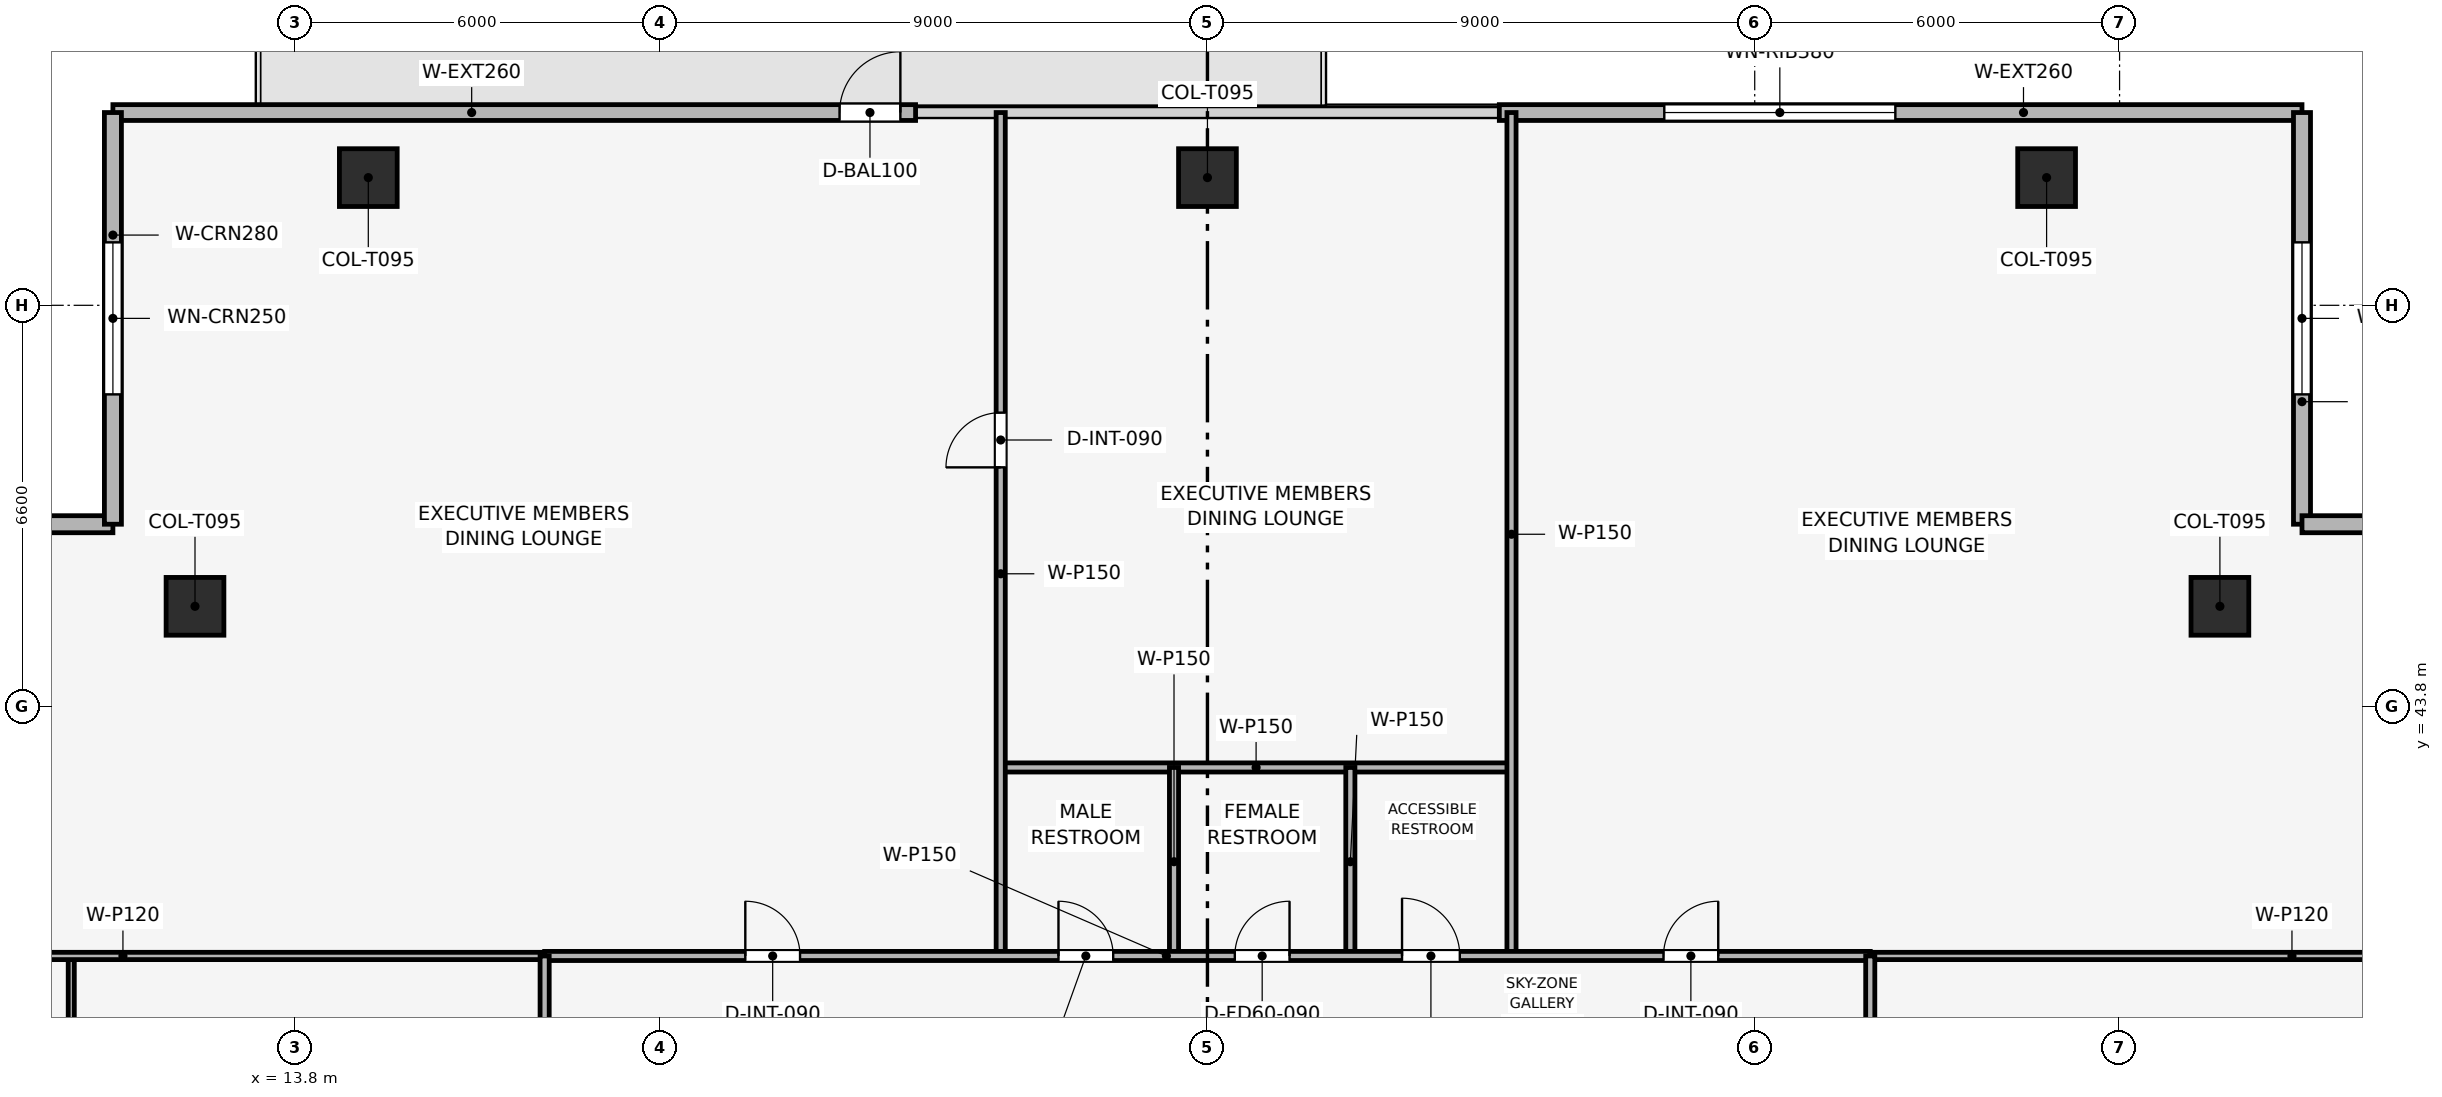
"""IFC4 building model, lengths in metres.
Left out: names, types, materials, properties, quantities, classifications, styles, units other than length and angle.
Written with IfcOpenShell. Run it as: python <this file> out.ifc"""

import sys

from ifc_helpers import new_model, si_unit, direction, frame, frame_2d, origin, origin_2d, place, context, subcontext, project, spatial, rectangle, extrude, element, fill, save


model = new_model("IFC4")
c1 = context("Model", 3, precision=1e-05, world=origin(), true_north=direction((0.0, 1.0)))
c2 = subcontext(c1, "Body", "Model", "MODEL_VIEW")
j1 = project(units=[si_unit("LENGTHUNIT", "METRE"), si_unit("PLANEANGLEUNIT", "RADIAN")], contexts=[c1])
p1 = place(None, origin())
s1 = spatial("IfcSite", under=j1, at=p1, CompositionType="ELEMENT")
p2 = place(p1, origin())
s2 = spatial("IfcBuilding", under=s1, at=p2, CompositionType="ELEMENT")
p3 = place(p2, frame((0.0, 0.0, 257.85)))
s3 = spatial("IfcBuildingStorey", under=s2, at=p3, CompositionType="ELEMENT", Elevation=257.85)
for number, where, z_axis, x_axis in (
    (1, (42.6, 52.5, 0.003), (0.0, 0.0, 1.0), (1.0, 0.0, 0.0)),
    (2, (28.8, 52.5, 0.003), (0.0, 0.0, 1.0), (1.0, 0.0, 0.0)),
    (3, (15.0, 52.5, 0.003), (0.0, 0.0, 1.0), (1.0, 0.0, 0.0)),
    (4, (45.45, 45.45, 0.003), (0.0, 0.0, 1.0), (1.0, 0.0, 0.0)),
    (5, (12.15, 45.45, 0.003), (0.0, 0.0, 1.0), (1.0, 0.0, 0.0)),
):
    element("IfcColumn", number, at=place(p3, frame(where, z_axis=z_axis, x_axis=x_axis)), inside=s3, PredefinedType="COLUMN", context=c2, shape_type="SweptSolid", body=[
        extrude(rectangle(XDim=0.95, YDim=0.95, at=origin_2d()), origin(), (0.0, 0.0, 1.0), 3.494),
    ])
p4 = place(p3, frame((10.8, 53.57, 0.0), z_axis=(0.0, 0.0, 1.0), x_axis=(1.0, 0.0, 0.0)))
e6 = element("IfcWall", 6, at=p4, inside=s3, PredefinedType="SOLIDWALL", context=c2, shape_type="SweptSolid", body=[
    extrude(rectangle(XDim=13.2, YDim=0.26, at=frame_2d((6.6, 0.0))), origin(), (0.0, 0.0, 1.0), 3.5),
])
p5 = place(p4, frame((11.95, 0.0, 0.0)))
e7 = element("IfcOpeningElement", 7, at=p5, cuts=e6, PredefinedType="OPENING", context=c2, shape_type="SweptSolid", body=[
    extrude(rectangle(XDim=1.0, YDim=2.2, at=frame_2d((0.5, 1.1))), frame((0.0, 0.14, 0.0), z_axis=(0.0, -1.0, 0.0), x_axis=(1.0, 0.0, 0.0)), (0.0, 0.0, 1.0), 0.28),
])
p6 = place(p3, frame((33.6, 53.57, 0.0), z_axis=(0.0, 0.0, 1.0), x_axis=(1.0, 0.0, 0.0)))
e8 = element("IfcWall", 8, at=p6, inside=s3, PredefinedType="SOLIDWALL", context=c2, shape_type="SweptSolid", body=[
    extrude(rectangle(XDim=13.2, YDim=0.26, at=frame_2d((6.6, 0.0))), origin(), (0.0, 0.0, 1.0), 3.5),
])
p7 = place(p6, frame((2.713, 0.0, 0.9)))
e9 = element("IfcOpeningElement", 9, at=p7, cuts=e8, PredefinedType="OPENING", context=c2, shape_type="SweptSolid", body=[
    extrude(rectangle(XDim=3.8, YDim=1.9, at=frame_2d((1.9, 0.95))), frame((0.0, 0.14, 0.0), z_axis=(0.0, -1.0, 0.0), x_axis=(1.0, 0.0, 0.0)), (0.0, 0.0, 1.0), 0.28),
])
p8 = place(p3, frame((4.03, 46.8, 0.0), z_axis=(0.0, 0.0, 1.0), x_axis=(1.0, 0.0, 0.0)))
e10 = element("IfcWall", 10, at=p8, inside=s3, PredefinedType="SOLIDWALL", context=c2, shape_type="SweptSolid", body=[
    extrude(rectangle(XDim=6.77, YDim=0.28, at=frame_2d((3.385, 0.0))), origin(), (0.0, 0.0, 1.0), 3.5),
])
p9 = place(p8, frame((2.135, 0.0, 0.9)))
e11 = element("IfcOpeningElement", 11, at=p9, cuts=e10, PredefinedType="OPENING", context=c2, shape_type="SweptSolid", body=[
    extrude(rectangle(XDim=2.5, YDim=1.9, at=frame_2d((1.25, 0.95))), frame((0.0, 0.15, 0.0), z_axis=(0.0, -1.0, 0.0), x_axis=(1.0, 0.0, 0.0)), (0.0, 0.0, 1.0), 0.3),
])
p10 = place(p3, frame((10.8, 46.8, 0.0), z_axis=(0.0, 0.0, 1.0), x_axis=(0.0, 1.0, 0.0)))
e12 = element("IfcWall", 12, at=p10, inside=s3, PredefinedType="SOLIDWALL", context=c2, shape_type="SweptSolid", body=[
    extrude(rectangle(XDim=6.77, YDim=0.28, at=frame_2d((3.385, 0.0))), origin(), (0.0, 0.0, 1.0), 3.5),
])
p11 = place(p10, frame((2.135, 0.0, 0.9)))
e13 = element("IfcOpeningElement", 13, at=p11, cuts=e12, PredefinedType="OPENING", context=c2, shape_type="SweptSolid", body=[
    extrude(rectangle(XDim=2.5, YDim=1.9, at=frame_2d((1.25, 0.95))), frame((0.0, 0.15, 0.0), z_axis=(0.0, -1.0, 0.0), x_axis=(1.0, 0.0, 0.0)), (0.0, 0.0, 1.0), 0.3),
])
p12 = place(p3, frame((46.8, 53.57, 0.0), z_axis=(0.0, 0.0, 1.0), x_axis=(0.0, -1.0, 0.0)))
e14 = element("IfcWall", 14, at=p12, inside=s3, PredefinedType="SOLIDWALL", context=c2, shape_type="SweptSolid", body=[
    extrude(rectangle(XDim=6.77, YDim=0.28, at=frame_2d((3.385, 0.0))), origin(), (0.0, 0.0, 1.0), 3.5),
])
p13 = place(p12, frame((2.135, 0.0, 0.9)))
e15 = element("IfcOpeningElement", 15, at=p13, cuts=e14, PredefinedType="OPENING", context=c2, shape_type="SweptSolid", body=[
    extrude(rectangle(XDim=2.5, YDim=1.9, at=frame_2d((1.25, 0.95))), frame((0.0, 0.15, 0.0), z_axis=(0.0, -1.0, 0.0), x_axis=(1.0, 0.0, 0.0)), (0.0, 0.0, 1.0), 0.3),
])
p14 = place(p3, frame((46.8, 46.8, 0.0), z_axis=(0.0, 0.0, 1.0), x_axis=(1.0, 0.0, 0.0)))
e16 = element("IfcWall", 16, at=p14, inside=s3, PredefinedType="SOLIDWALL", context=c2, shape_type="SweptSolid", body=[
    extrude(rectangle(XDim=6.77, YDim=0.28, at=frame_2d((3.385, 0.0))), origin(), (0.0, 0.0, 1.0), 3.5),
])
p15 = place(p14, frame((2.135, 0.0, 0.9)))
e17 = element("IfcOpeningElement", 17, at=p15, cuts=e16, PredefinedType="OPENING", context=c2, shape_type="SweptSolid", body=[
    extrude(rectangle(XDim=2.5, YDim=1.9, at=frame_2d((1.25, 0.95))), frame((0.0, 0.15, 0.0), z_axis=(0.0, -1.0, 0.0), x_axis=(1.0, 0.0, 0.0)), (0.0, 0.0, 1.0), 0.3),
])
p16 = place(p3, frame((25.4, 42.8, 0.0), z_axis=(0.0, 0.0, 1.0), x_axis=(1.0, 0.0, 0.0)))
e18 = element("IfcWall", 18, at=p16, inside=s3, PredefinedType="PARTITIONING", context=c2, shape_type="SweptSolid", body=[
    extrude(rectangle(XDim=8.4, YDim=0.15, at=frame_2d((4.2, 0.0))), origin(), (0.0, 0.0, 1.0), 3.085),
])
p17 = place(p3, frame((25.4, 39.7, 0.0), z_axis=(0.0, 0.0, 1.0), x_axis=(0.0, 1.0, 0.0)))
e19 = element("IfcWall", 19, at=p17, inside=s3, PredefinedType="PARTITIONING", context=c2, shape_type="SweptSolid", body=[
    extrude(rectangle(XDim=13.87, YDim=0.15, at=frame_2d((6.935, 0.0))), origin(), (0.0, 0.0, 1.0), 3.085),
])
p18 = place(p17, frame((8.035, 0.0, 0.0)))
e20 = element("IfcOpeningElement", 20, at=p18, cuts=e19, PredefinedType="OPENING", context=c2, shape_type="SweptSolid", body=[
    extrude(rectangle(XDim=0.9, YDim=2.1, at=frame_2d((0.45, 1.05))), frame((0.0, 0.085, 0.0), z_axis=(0.0, -1.0, 0.0), x_axis=(1.0, 0.0, 0.0)), (0.0, 0.0, 1.0), 0.17),
])
p19 = place(p3, frame((33.8, 39.7, 0.0), z_axis=(0.0, 0.0, 1.0), x_axis=(0.0, 1.0, 0.0)))
e21 = element("IfcWall", 21, at=p19, inside=s3, PredefinedType="PARTITIONING", context=c2, shape_type="SweptSolid", body=[
    extrude(rectangle(XDim=13.87, YDim=0.15, at=frame_2d((6.935, 0.0))), origin(), (0.0, 0.0, 1.0), 3.085),
])
for number, where, z_axis, x_axis in (
    (22, (28.25, 39.7, 0.0), (0.0, 0.0, 1.0), (0.0, 1.0, 0.0)),
    (23, (31.15, 39.7, 0.0), (0.0, 0.0, 1.0), (0.0, 1.0, 0.0)),
):
    element("IfcWall", number, at=place(p3, frame(where, z_axis=z_axis, x_axis=x_axis)), inside=s3, PredefinedType="PARTITIONING", context=c2, shape_type="SweptSolid", body=[
        extrude(rectangle(XDim=3.1, YDim=0.15, at=frame_2d((1.55, 0.0))), origin(), (0.0, 0.0, 1.0), 3.5),
    ])
p20 = place(p3, frame((10.115, 29.235, 0.0), z_axis=(0.0, 0.0, 1.0), x_axis=(0.0, 1.0, 0.0)))
e24 = element("IfcWall", 24, at=p20, inside=s3, PredefinedType="MOVABLE", context=c2, shape_type="SweptSolid", body=[
    extrude(rectangle(XDim=10.465, YDim=0.1, at=frame_2d((5.232, 0.0))), origin(), (0.0, 0.0, 1.0), 3.085),
])
p21 = place(p20, frame((5.928, 0.0, 0.0)))
e25 = element("IfcOpeningElement", 25, at=p21, cuts=e24, PredefinedType="OPENING", context=c2, shape_type="SweptSolid", body=[
    extrude(rectangle(XDim=0.9, YDim=2.1, at=frame_2d((0.45, 1.05))), frame((0.0, 0.06, 0.0), z_axis=(0.0, -1.0, 0.0), x_axis=(1.0, 0.0, 0.0)), (0.0, 0.0, 1.0), 0.12),
])
p22 = place(p3, frame((4.03, 39.7, 0.0), z_axis=(0.0, 0.0, 1.0), x_axis=(1.0, 0.0, 0.0)))
e26 = element("IfcWall", 26, at=p22, inside=s3, PredefinedType="PARTITIONING", context=c2, shape_type="SweptSolid", body=[
    extrude(rectangle(XDim=13.87, YDim=0.12, at=frame_2d((6.935, 0.0))), origin(), (0.0, 0.0, 1.0), 3.085),
])
p23 = place(p3, frame((39.7, 39.7, 0.0), z_axis=(0.0, 0.0, 1.0), x_axis=(1.0, 0.0, 0.0)))
e27 = element("IfcWall", 27, at=p23, inside=s3, PredefinedType="PARTITIONING", context=c2, shape_type="SweptSolid", body=[
    extrude(rectangle(XDim=13.87, YDim=0.12, at=frame_2d((6.935, 0.0))), origin(), (0.0, 0.0, 1.0), 3.085),
])
p24 = place(p3, frame((17.9, 39.7, 0.0), z_axis=(0.0, 0.0, 1.0), x_axis=(1.0, 0.0, 0.0)))
e28 = element("IfcWall", 28, at=p24, inside=s3, PredefinedType="PARTITIONING", context=c2, shape_type="SweptSolid", body=[
    extrude(rectangle(XDim=21.8, YDim=0.15, at=frame_2d((10.9, 0.0))), origin(), (0.0, 0.0, 1.0), 3.085),
])
p25 = place(p24, frame((3.3, 0.0, 0.0)))
e29 = element("IfcOpeningElement", 29, at=p25, cuts=e28, PredefinedType="OPENING", context=c2, shape_type="SweptSolid", body=[
    extrude(rectangle(XDim=0.9, YDim=2.1, at=frame_2d((0.45, 1.05))), frame((0.0, 0.085, 0.0), z_axis=(0.0, -1.0, 0.0), x_axis=(1.0, 0.0, 0.0)), (0.0, 0.0, 1.0), 0.17),
])
p26 = place(p24, frame((8.45, 0.0, 0.0)))
e30 = element("IfcOpeningElement", 30, at=p26, cuts=e28, PredefinedType="OPENING", context=c2, shape_type="SweptSolid", body=[
    extrude(rectangle(XDim=0.9, YDim=2.1, at=frame_2d((0.45, 1.05))), frame((0.0, 0.085, 0.0), z_axis=(0.0, -1.0, 0.0), x_axis=(1.0, 0.0, 0.0)), (0.0, 0.0, 1.0), 0.17),
])
p27 = place(p24, frame((11.35, 0.0, 0.0)))
e31 = element("IfcOpeningElement", 31, at=p27, cuts=e28, PredefinedType="OPENING", context=c2, shape_type="SweptSolid", body=[
    extrude(rectangle(XDim=0.9, YDim=2.1, at=frame_2d((0.45, 1.05))), frame((0.0, 0.085, 0.0), z_axis=(0.0, -1.0, 0.0), x_axis=(1.0, 0.0, 0.0)), (0.0, 0.0, 1.0), 0.17),
])
p28 = place(p24, frame((14.1, 0.0, 0.0)))
e32 = element("IfcOpeningElement", 32, at=p28, cuts=e28, PredefinedType="OPENING", context=c2, shape_type="SweptSolid", body=[
    extrude(rectangle(XDim=0.95, YDim=2.1, at=frame_2d((0.475, 1.05))), frame((0.0, 0.085, 0.0), z_axis=(0.0, -1.0, 0.0), x_axis=(1.0, 0.0, 0.0)), (0.0, 0.0, 1.0), 0.17),
])
p29 = place(p24, frame((18.4, 0.0, 0.0)))
e33 = element("IfcOpeningElement", 33, at=p29, cuts=e28, PredefinedType="OPENING", context=c2, shape_type="SweptSolid", body=[
    extrude(rectangle(XDim=0.9, YDim=2.1, at=frame_2d((0.45, 1.05))), frame((0.0, 0.085, 0.0), z_axis=(0.0, -1.0, 0.0), x_axis=(1.0, 0.0, 0.0)), (0.0, 0.0, 1.0), 0.17),
])
p30 = place(p3, frame((17.9, 10.8, 0.0), z_axis=(0.0, 0.0, 1.0), x_axis=(0.0, 1.0, 0.0)))
e34 = element("IfcWall", 34, at=p30, inside=s3, PredefinedType="PARTITIONING", context=c2, shape_type="SweptSolid", body=[
    extrude(rectangle(XDim=28.9, YDim=0.15, at=frame_2d((14.45, 0.0))), origin(), (0.0, 0.0, 1.0), 3.085),
])
p31 = place(p30, frame((0.7, 0.0, 0.0)))
e35 = element("IfcOpeningElement", 35, at=p31, cuts=e34, PredefinedType="OPENING", context=c2, shape_type="SweptSolid", body=[
    extrude(rectangle(XDim=0.9, YDim=2.1, at=frame_2d((0.45, 1.05))), frame((0.0, 0.085, 0.0), z_axis=(0.0, -1.0, 0.0), x_axis=(1.0, 0.0, 0.0)), (0.0, 0.0, 1.0), 0.17),
])
p32 = place(p30, frame((5.952, 0.0, 0.0)))
e36 = element("IfcOpeningElement", 36, at=p32, cuts=e34, PredefinedType="OPENING", context=c2, shape_type="SweptSolid", body=[
    extrude(rectangle(XDim=0.9, YDim=2.1, at=frame_2d((0.45, 1.05))), frame((0.0, 0.085, 0.0), z_axis=(0.0, -1.0, 0.0), x_axis=(1.0, 0.0, 0.0)), (0.0, 0.0, 1.0), 0.17),
])
p33 = place(p30, frame((14.02, 0.0, 0.0)))
e37 = element("IfcOpeningElement", 37, at=p33, cuts=e34, PredefinedType="OPENING", context=c2, shape_type="SweptSolid", body=[
    extrude(rectangle(XDim=0.9, YDim=2.1, at=frame_2d((0.45, 1.05))), frame((0.0, 0.085, 0.0), z_axis=(0.0, -1.0, 0.0), x_axis=(1.0, 0.0, 0.0)), (0.0, 0.0, 1.0), 0.17),
])
p34 = place(p30, frame((23.217, 0.0, 0.0)))
e38 = element("IfcOpeningElement", 38, at=p34, cuts=e34, PredefinedType="OPENING", context=c2, shape_type="SweptSolid", body=[
    extrude(rectangle(XDim=0.9, YDim=2.1, at=frame_2d((0.45, 1.05))), frame((0.0, 0.085, 0.0), z_axis=(0.0, -1.0, 0.0), x_axis=(1.0, 0.0, 0.0)), (0.0, 0.0, 1.0), 0.17),
])
p35 = place(p3, frame((39.7, 24.4, 0.0), z_axis=(0.0, 0.0, 1.0), x_axis=(0.0, 1.0, 0.0)))
e39 = element("IfcWall", 39, at=p35, inside=s3, PredefinedType="PARTITIONING", context=c2, shape_type="SweptSolid", body=[
    extrude(rectangle(XDim=15.3, YDim=0.15, at=frame_2d((7.65, 0.0))), origin(), (0.0, 0.0, 1.0), 3.085),
])
p36 = place(p35, frame((3.032, 0.0, 0.0)))
e40 = element("IfcOpeningElement", 40, at=p36, cuts=e39, PredefinedType="OPENING", context=c2, shape_type="SweptSolid", body=[
    extrude(rectangle(XDim=0.9, YDim=2.1, at=frame_2d((0.45, 1.05))), frame((0.0, 0.085, 0.0), z_axis=(0.0, -1.0, 0.0), x_axis=(1.0, 0.0, 0.0)), (0.0, 0.0, 1.0), 0.17),
])
p37 = place(p35, frame((10.682, 0.0, 0.0)))
e41 = element("IfcOpeningElement", 41, at=p37, cuts=e39, PredefinedType="OPENING", context=c2, shape_type="SweptSolid", body=[
    extrude(rectangle(XDim=0.9, YDim=2.1, at=frame_2d((0.45, 1.05))), frame((0.0, 0.085, 0.0), z_axis=(0.0, -1.0, 0.0), x_axis=(1.0, 0.0, 0.0)), (0.0, 0.0, 1.0), 0.17),
])
p38 = place(p5, origin())
e42 = element("IfcDoor", 42, at=p38, inside=s3, OperationType="SINGLE_SWING_RIGHT", PredefinedType="DOOR", context=c2, shape_type="SweptSolid", body=[
    extrude(rectangle(XDim=1.0, YDim=2.2, at=frame_2d((0.5, 1.1))), frame((0.0, 0.025, 0.0), z_axis=(0.0, -1.0, 0.0), x_axis=(1.0, 0.0, 0.0)), (0.0, 0.0, 1.0), 0.05),
])
fill(e7, e42)
p39 = place(p7, origin())
e43 = element("IfcWindow", 43, at=p39, inside=s3, PartitioningType="SINGLE_PANEL", PredefinedType="WINDOW", context=c2, shape_type="SweptSolid", body=[
    extrude(rectangle(XDim=3.8, YDim=1.9, at=frame_2d((1.9, 0.95))), frame((0.0, 0.03, 0.0), z_axis=(0.0, -1.0, 0.0), x_axis=(1.0, 0.0, 0.0)), (0.0, 0.0, 1.0), 0.06),
])
fill(e9, e43)
p40 = place(p11, origin())
e44 = element("IfcWindow", 44, at=p40, inside=s3, PartitioningType="SINGLE_PANEL", PredefinedType="WINDOW", context=c2, shape_type="SweptSolid", body=[
    extrude(rectangle(XDim=2.5, YDim=1.9, at=frame_2d((1.25, 0.95))), frame((0.0, 0.03, 0.0), z_axis=(0.0, -1.0, 0.0), x_axis=(1.0, 0.0, 0.0)), (0.0, 0.0, 1.0), 0.06),
])
fill(e13, e44)
p41 = place(p13, origin())
e45 = element("IfcWindow", 45, at=p41, inside=s3, PartitioningType="SINGLE_PANEL", PredefinedType="WINDOW", context=c2, shape_type="SweptSolid", body=[
    extrude(rectangle(XDim=2.5, YDim=1.9, at=frame_2d((1.25, 0.95))), frame((0.0, 0.03, 0.0), z_axis=(0.0, -1.0, 0.0), x_axis=(1.0, 0.0, 0.0)), (0.0, 0.0, 1.0), 0.06),
])
fill(e15, e45)
p42 = place(p18, origin())
e46 = element("IfcDoor", 46, at=p42, inside=s3, OperationType="SINGLE_SWING_LEFT", PredefinedType="DOOR", context=c2, shape_type="SweptSolid", body=[
    extrude(rectangle(XDim=0.9, YDim=2.1, at=frame_2d((0.45, 1.05))), frame((0.0, 0.025, 0.0), z_axis=(0.0, -1.0, 0.0), x_axis=(1.0, 0.0, 0.0)), (0.0, 0.0, 1.0), 0.05),
])
fill(e20, e46)
p43 = place(p25, origin())
e47 = element("IfcDoor", 47, at=p43, inside=s3, OperationType="SINGLE_SWING_LEFT", PredefinedType="DOOR", context=c2, shape_type="SweptSolid", body=[
    extrude(rectangle(XDim=0.9, YDim=2.1, at=frame_2d((0.45, 1.05))), frame((0.0, 0.025, 0.0), z_axis=(0.0, -1.0, 0.0), x_axis=(1.0, 0.0, 0.0)), (0.0, 0.0, 1.0), 0.05),
])
fill(e29, e47)
p44 = place(p26, origin())
e48 = element("IfcDoor", 48, at=p44, inside=s3, OperationType="SINGLE_SWING_LEFT", PredefinedType="DOOR", context=c2, shape_type="SweptSolid", body=[
    extrude(rectangle(XDim=0.9, YDim=2.1, at=frame_2d((0.45, 1.05))), frame((0.0, 0.025, 0.0), z_axis=(0.0, -1.0, 0.0), x_axis=(1.0, 0.0, 0.0)), (0.0, 0.0, 1.0), 0.05),
])
fill(e30, e48)
p45 = place(p27, origin())
e49 = element("IfcDoor", 49, at=p45, inside=s3, OperationType="SINGLE_SWING_RIGHT", PredefinedType="DOOR", context=c2, shape_type="SweptSolid", body=[
    extrude(rectangle(XDim=0.9, YDim=2.1, at=frame_2d((0.45, 1.05))), frame((0.0, 0.025, 0.0), z_axis=(0.0, -1.0, 0.0), x_axis=(1.0, 0.0, 0.0)), (0.0, 0.0, 1.0), 0.05),
])
fill(e31, e49)
p46 = place(p28, origin())
e50 = element("IfcDoor", 50, at=p46, inside=s3, OperationType="SINGLE_SWING_LEFT", PredefinedType="DOOR", context=c2, shape_type="SweptSolid", body=[
    extrude(rectangle(XDim=0.95, YDim=2.1, at=frame_2d((0.475, 1.05))), frame((0.0, 0.025, 0.0), z_axis=(0.0, -1.0, 0.0), x_axis=(1.0, 0.0, 0.0)), (0.0, 0.0, 1.0), 0.05),
])
fill(e32, e50)
p47 = place(p29, origin())
e51 = element("IfcDoor", 51, at=p47, inside=s3, OperationType="SINGLE_SWING_RIGHT", PredefinedType="DOOR", context=c2, shape_type="SweptSolid", body=[
    extrude(rectangle(XDim=0.9, YDim=2.1, at=frame_2d((0.45, 1.05))), frame((0.0, 0.025, 0.0), z_axis=(0.0, -1.0, 0.0), x_axis=(1.0, 0.0, 0.0)), (0.0, 0.0, 1.0), 0.05),
])
fill(e33, e51)
save(model, sys.argv[1])
